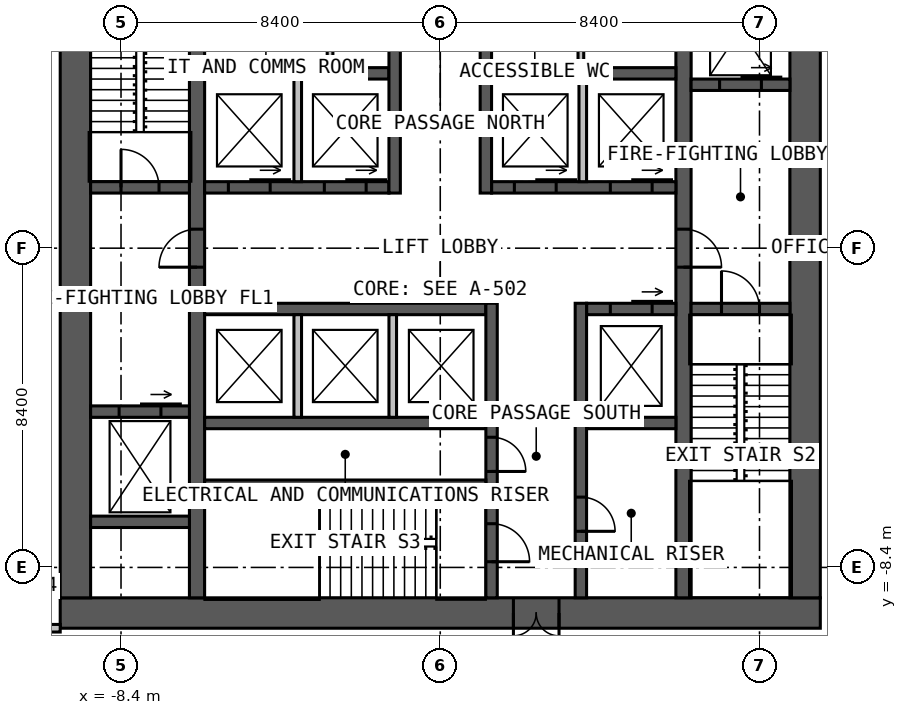
"""IFC4 building model, lengths in metres.
Left out: names, types, materials, properties, quantities, classifications, styles, units other than length and angle.
Written with IfcOpenShell. Run it as: python <this file> out.ifc"""

import sys

from ifc_helpers import new_model, si_unit, direction, frame, frame_2d, origin, place, context, subcontext, project, spatial, rectangle, extrude, element, fill, save


model = new_model("IFC4")
c1 = context("Model", 3, precision=1e-05, world=origin(), true_north=direction((0.0, 1.0)))
c2 = subcontext(c1, "Body", "Model", "MODEL_VIEW")
j1 = project(units=[si_unit("LENGTHUNIT", "METRE"), si_unit("PLANEANGLEUNIT", "RADIAN")], contexts=[c1])
p1 = place(None, origin())
s1 = spatial("IfcSite", under=j1, at=p1, CompositionType="ELEMENT")
p2 = place(p1, origin())
s2 = spatial("IfcBuilding", under=s1, at=p2, CompositionType="ELEMENT")
p3 = place(p2, frame((0.0, 0.0, 65.0)))
s3 = spatial("IfcBuildingStorey", under=s2, at=p3, CompositionType="ELEMENT", Elevation=65.0)
p4 = place(p3, frame((10.0, -9.6, 0.0), z_axis=(0.0, 0.0, 1.0), x_axis=(-1.0, 0.0, 0.0)))
e1 = element("IfcWall", 1, at=p4, inside=s3, PredefinedType="SOLIDWALL", context=c2, shape_type="SweptSolid", body=[
    extrude(rectangle(XDim=20.0, YDim=0.8, at=frame_2d((10.0, 0.0))), origin(), (0.0, 0.0, 1.0), 4.0),
])
p5 = place(p4, frame((6.875, 0.0, 0.0)))
e2 = element("IfcOpeningElement", 2, at=p5, cuts=e1, PredefinedType="OPENING", context=c2, shape_type="SweptSolid", body=[
    extrude(rectangle(XDim=1.2, YDim=2.2, at=frame_2d((0.6, 1.1))), frame((0.0, 0.41, 0.0), z_axis=(0.0, -1.0, 0.0), x_axis=(1.0, 0.0, 0.0)), (0.0, 0.0, 1.0), 0.82),
])
for number, where, z_axis, x_axis in (
    (3, (9.6, -9.2, 0.0), (0.0, 0.0, 1.0), (0.0, 1.0, 0.0)),
    (4, (-9.6, 9.2, 0.0), (0.0, 0.0, 1.0), (0.0, -1.0, 0.0)),
):
    element("IfcWall", number, at=place(p3, frame(where, z_axis=z_axis, x_axis=x_axis)), inside=s3, PredefinedType="SOLIDWALL", context=c2, shape_type="SweptSolid", body=[
        extrude(rectangle(XDim=18.4, YDim=0.8, at=frame_2d((9.2, 0.0))), origin(), (0.0, 0.0, 1.0), 4.0),
    ])
p6 = place(p3, frame((-6.4, -9.2, 0.0), z_axis=(0.0, 0.0, 1.0), x_axis=(0.0, 1.0, 0.0)))
e5 = element("IfcWall", 5, at=p6, inside=s3, PredefinedType="SOLIDWALL", context=c2, shape_type="SweptSolid", body=[
    extrude(rectangle(XDim=18.4, YDim=0.4, at=frame_2d((9.2, 0.0))), origin(), (0.0, 0.0, 1.0), 4.0),
])
p7 = place(p6, frame((8.7, 0.0, 0.0)))
e6 = element("IfcOpeningElement", 6, at=p7, cuts=e5, PredefinedType="OPENING", context=c2, shape_type="SweptSolid", body=[
    extrude(rectangle(XDim=1.0, YDim=2.2, at=frame_2d((0.5, 1.1))), frame((0.0, 0.21, 0.0), z_axis=(0.0, -1.0, 0.0), x_axis=(1.0, 0.0, 0.0)), (0.0, 0.0, 1.0), 0.42),
])
p8 = place(p3, frame((6.4, 9.2, 0.0), z_axis=(0.0, 0.0, 1.0), x_axis=(0.0, -1.0, 0.0)))
e7 = element("IfcWall", 7, at=p8, inside=s3, PredefinedType="SOLIDWALL", context=c2, shape_type="SweptSolid", body=[
    extrude(rectangle(XDim=18.4, YDim=0.4, at=frame_2d((9.2, 0.0))), origin(), (0.0, 0.0, 1.0), 4.0),
])
p9 = place(p8, frame((8.7, 0.0, 0.0)))
e8 = element("IfcOpeningElement", 8, at=p9, cuts=e7, PredefinedType="OPENING", context=c2, shape_type="SweptSolid", body=[
    extrude(rectangle(XDim=1.0, YDim=2.2, at=frame_2d((0.5, 1.1))), frame((0.0, 0.21, 0.0), z_axis=(0.0, -1.0, 0.0), x_axis=(1.0, 0.0, 0.0)), (0.0, 0.0, 1.0), 0.42),
])
p10 = place(p3, frame((-6.2, 1.6, 0.0), z_axis=(0.0, 0.0, 1.0), x_axis=(1.0, 0.0, 0.0)))
e9 = element("IfcWall", 9, at=p10, inside=s3, PredefinedType="SOLIDWALL", context=c2, shape_type="SweptSolid", body=[
    extrude(rectangle(XDim=4.85, YDim=0.3, at=frame_2d((2.425, 0.0))), origin(), (0.0, 0.0, 1.0), 4.0),
])
p11 = place(p10, frame((0.625, 0.0, 0.0)))
e10 = element("IfcOpeningElement", 10, at=p11, cuts=e9, PredefinedType="OPENING", context=c2, shape_type="SweptSolid", body=[
    extrude(rectangle(XDim=1.1, YDim=2.2, at=frame_2d((0.55, 1.1))), frame((0.0, 0.16, 0.0), z_axis=(0.0, -1.0, 0.0), x_axis=(1.0, 0.0, 0.0)), (0.0, 0.0, 1.0), 0.32),
])
p12 = place(p10, frame((3.15, 0.0, 0.0)))
e11 = element("IfcOpeningElement", 11, at=p12, cuts=e9, PredefinedType="OPENING", context=c2, shape_type="SweptSolid", body=[
    extrude(rectangle(XDim=1.1, YDim=2.2, at=frame_2d((0.55, 1.1))), frame((0.0, 0.16, 0.0), z_axis=(0.0, -1.0, 0.0), x_axis=(1.0, 0.0, 0.0)), (0.0, 0.0, 1.0), 0.32),
])
p13 = place(p3, frame((1.35, 1.6, 0.0), z_axis=(0.0, 0.0, 1.0), x_axis=(1.0, 0.0, 0.0)))
e12 = element("IfcWall", 12, at=p13, inside=s3, PredefinedType="SOLIDWALL", context=c2, shape_type="SweptSolid", body=[
    extrude(rectangle(XDim=4.85, YDim=0.3, at=frame_2d((2.425, 0.0))), origin(), (0.0, 0.0, 1.0), 4.0),
])
p14 = place(p13, frame((0.6, 0.0, 0.0)))
e13 = element("IfcOpeningElement", 13, at=p14, cuts=e12, PredefinedType="OPENING", context=c2, shape_type="SweptSolid", body=[
    extrude(rectangle(XDim=1.1, YDim=2.2, at=frame_2d((0.55, 1.1))), frame((0.0, 0.16, 0.0), z_axis=(0.0, -1.0, 0.0), x_axis=(1.0, 0.0, 0.0)), (0.0, 0.0, 1.0), 0.32),
])
p15 = place(p13, frame((3.125, 0.0, 0.0)))
e14 = element("IfcOpeningElement", 14, at=p15, cuts=e12, PredefinedType="OPENING", context=c2, shape_type="SweptSolid", body=[
    extrude(rectangle(XDim=1.1, YDim=2.2, at=frame_2d((0.55, 1.1))), frame((0.0, 0.16, 0.0), z_axis=(0.0, -1.0, 0.0), x_axis=(1.0, 0.0, 0.0)), (0.0, 0.0, 1.0), 0.32),
])
for number, where, z_axis, x_axis in (
    (15, (-6.2, 4.6, 0.0), (0.0, 0.0, 1.0), (1.0, 0.0, 0.0)),
    (16, (1.35, 4.6, 0.0), (0.0, 0.0, 1.0), (1.0, 0.0, 0.0)),
):
    element("IfcWall", number, at=place(p3, frame(where, z_axis=z_axis, x_axis=x_axis)), inside=s3, PredefinedType="SOLIDWALL", context=c2, shape_type="SweptSolid", body=[
        extrude(rectangle(XDim=4.85, YDim=0.3, at=frame_2d((2.425, 0.0))), origin(), (0.0, 0.0, 1.0), 4.0),
    ])
p16 = place(p3, frame((-1.2, 1.45, 0.0), z_axis=(0.0, 0.0, 1.0), x_axis=(0.0, 1.0, 0.0)))
e17 = element("IfcWall", 17, at=p16, inside=s3, PredefinedType="SOLIDWALL", context=c2, shape_type="SweptSolid", body=[
    extrude(rectangle(XDim=7.75, YDim=0.3, at=frame_2d((3.875, 0.0))), origin(), (0.0, 0.0, 1.0), 4.0),
])
p17 = place(p16, frame((5.05, 0.0, 0.0)))
e18 = element("IfcOpeningElement", 18, at=p17, cuts=e17, PredefinedType="OPENING", context=c2, shape_type="SweptSolid", body=[
    extrude(rectangle(XDim=1.0, YDim=2.2, at=frame_2d((0.5, 1.1))), frame((0.0, 0.16, 0.0), z_axis=(0.0, -1.0, 0.0), x_axis=(1.0, 0.0, 0.0)), (0.0, 0.0, 1.0), 0.32),
])
p18 = place(p3, frame((1.2, 1.45, 0.0), z_axis=(0.0, 0.0, 1.0), x_axis=(0.0, 1.0, 0.0)))
e19 = element("IfcWall", 19, at=p18, inside=s3, PredefinedType="SOLIDWALL", context=c2, shape_type="SweptSolid", body=[
    extrude(rectangle(XDim=7.75, YDim=0.3, at=frame_2d((3.875, 0.0))), origin(), (0.0, 0.0, 1.0), 4.0),
])
p19 = place(p18, frame((3.8, 0.0, 0.0)))
e20 = element("IfcOpeningElement", 20, at=p19, cuts=e19, PredefinedType="OPENING", context=c2, shape_type="SweptSolid", body=[
    extrude(rectangle(XDim=1.0, YDim=2.2, at=frame_2d((0.5, 1.1))), frame((0.0, 0.16, 0.0), z_axis=(0.0, -1.0, 0.0), x_axis=(1.0, 0.0, 0.0)), (0.0, 0.0, 1.0), 0.32),
])
p20 = place(p18, frame((6.15, 0.0, 0.0)))
e21 = element("IfcOpeningElement", 21, at=p20, cuts=e19, PredefinedType="OPENING", context=c2, shape_type="SweptSolid", body=[
    extrude(rectangle(XDim=1.0, YDim=2.2, at=frame_2d((0.5, 1.1))), frame((0.0, 0.16, 0.0), z_axis=(0.0, -1.0, 0.0), x_axis=(1.0, 0.0, 0.0)), (0.0, 0.0, 1.0), 0.32),
])
p21 = place(p3, frame((-6.2, -1.6, 0.0), z_axis=(0.0, 0.0, 1.0), x_axis=(1.0, 0.0, 0.0)))
e22 = element("IfcWall", 22, at=p21, inside=s3, PredefinedType="SOLIDWALL", context=c2, shape_type="SweptSolid", body=[
    extrude(rectangle(XDim=7.4, YDim=0.3, at=frame_2d((3.7, 0.0))), origin(), (0.0, 0.0, 1.0), 4.0),
])
p22 = place(p3, frame((3.85, -1.6, 0.0), z_axis=(0.0, 0.0, 1.0), x_axis=(1.0, 0.0, 0.0)))
e23 = element("IfcWall", 23, at=p22, inside=s3, PredefinedType="SOLIDWALL", context=c2, shape_type="SweptSolid", body=[
    extrude(rectangle(XDim=2.35, YDim=0.3, at=frame_2d((1.175, 0.0))), origin(), (0.0, 0.0, 1.0), 4.0),
])
p23 = place(p22, frame((0.625, 0.0, 0.0)))
e24 = element("IfcOpeningElement", 24, at=p23, cuts=e23, PredefinedType="OPENING", context=c2, shape_type="SweptSolid", body=[
    extrude(rectangle(XDim=1.1, YDim=2.2, at=frame_2d((0.55, 1.1))), frame((0.0, 0.16, 0.0), z_axis=(0.0, -1.0, 0.0), x_axis=(1.0, 0.0, 0.0)), (0.0, 0.0, 1.0), 0.32),
])
p24 = place(p3, frame((-6.2, -4.6, 0.0), z_axis=(0.0, 0.0, 1.0), x_axis=(1.0, 0.0, 0.0)))
e25 = element("IfcWall", 25, at=p24, inside=s3, PredefinedType="SOLIDWALL", context=c2, shape_type="SweptSolid", body=[
    extrude(rectangle(XDim=7.4, YDim=0.3, at=frame_2d((3.7, 0.0))), origin(), (0.0, 0.0, 1.0), 4.0),
])
p25 = place(p3, frame((3.85, -4.6, 0.0), z_axis=(0.0, 0.0, 1.0), x_axis=(1.0, 0.0, 0.0)))
e26 = element("IfcWall", 26, at=p25, inside=s3, PredefinedType="SOLIDWALL", context=c2, shape_type="SweptSolid", body=[
    extrude(rectangle(XDim=2.35, YDim=0.3, at=frame_2d((1.175, 0.0))), origin(), (0.0, 0.0, 1.0), 4.0),
])
p26 = place(p3, frame((1.35, -1.45, 0.0), z_axis=(0.0, 0.0, 1.0), x_axis=(0.0, -1.0, 0.0)))
e27 = element("IfcWall", 27, at=p26, inside=s3, PredefinedType="SOLIDWALL", context=c2, shape_type="SweptSolid", body=[
    extrude(rectangle(XDim=7.75, YDim=0.3, at=frame_2d((3.875, 0.0))), origin(), (0.0, 0.0, 1.0), 4.0),
])
p27 = place(p26, frame((5.8, 0.0, 0.0)))
e28 = element("IfcOpeningElement", 28, at=p27, cuts=e27, PredefinedType="OPENING", context=c2, shape_type="SweptSolid", body=[
    extrude(rectangle(XDim=1.0, YDim=2.2, at=frame_2d((0.5, 1.1))), frame((0.0, 0.16, 0.0), z_axis=(0.0, -1.0, 0.0), x_axis=(1.0, 0.0, 0.0)), (0.0, 0.0, 1.0), 0.32),
])
p28 = place(p26, frame((3.525, 0.0, 0.0)))
e29 = element("IfcOpeningElement", 29, at=p28, cuts=e27, PredefinedType="OPENING", context=c2, shape_type="SweptSolid", body=[
    extrude(rectangle(XDim=0.9, YDim=2.2, at=frame_2d((0.45, 1.1))), frame((0.0, 0.16, 0.0), z_axis=(0.0, -1.0, 0.0), x_axis=(1.0, 0.0, 0.0)), (0.0, 0.0, 1.0), 0.32),
])
p29 = place(p3, frame((3.7, -1.45, 0.0), z_axis=(0.0, 0.0, 1.0), x_axis=(0.0, -1.0, 0.0)))
e30 = element("IfcWall", 30, at=p29, inside=s3, PredefinedType="SOLIDWALL", context=c2, shape_type="SweptSolid", body=[
    extrude(rectangle(XDim=7.75, YDim=0.3, at=frame_2d((3.875, 0.0))), origin(), (0.0, 0.0, 1.0), 4.0),
])
p30 = place(p29, frame((5.1, 0.0, 0.0)))
e31 = element("IfcOpeningElement", 31, at=p30, cuts=e30, PredefinedType="OPENING", context=c2, shape_type="SweptSolid", body=[
    extrude(rectangle(XDim=0.9, YDim=2.2, at=frame_2d((0.45, 1.1))), frame((0.0, 0.16, 0.0), z_axis=(0.0, -1.0, 0.0), x_axis=(1.0, 0.0, 0.0)), (0.0, 0.0, 1.0), 0.32),
])
p31 = place(p3, frame((-6.2, -6.2, 0.0), z_axis=(0.0, 0.0, 1.0), x_axis=(1.0, 0.0, 0.0)))
e32 = element("IfcWall", 32, at=p31, inside=s3, PredefinedType="SOLIDWALL", context=c2, shape_type="SweptSolid", body=[
    extrude(rectangle(XDim=7.4, YDim=0.2, at=frame_2d((3.7, 0.0))), origin(), (0.0, 0.0, 1.0), 4.0),
])
p32 = place(p3, frame((-9.2, 1.6, 0.0), z_axis=(0.0, 0.0, 1.0), x_axis=(1.0, 0.0, 0.0)))
e33 = element("IfcWall", 33, at=p32, inside=s3, PredefinedType="SOLIDWALL", context=c2, shape_type="SweptSolid", body=[
    extrude(rectangle(XDim=2.6, YDim=0.3, at=frame_2d((1.3, 0.0))), origin(), (0.0, 0.0, 1.0), 4.0),
])
p33 = place(p32, frame((0.8, 0.0, 0.0)))
e34 = element("IfcOpeningElement", 34, at=p33, cuts=e33, PredefinedType="OPENING", context=c2, shape_type="SweptSolid", body=[
    extrude(rectangle(XDim=1.0, YDim=2.2, at=frame_2d((0.5, 1.1))), frame((0.0, 0.16, 0.0), z_axis=(0.0, -1.0, 0.0), x_axis=(1.0, 0.0, 0.0)), (0.0, 0.0, 1.0), 0.32),
])
p34 = place(p3, frame((6.6, -1.6, 0.0), z_axis=(0.0, 0.0, 1.0), x_axis=(1.0, 0.0, 0.0)))
e35 = element("IfcWall", 35, at=p34, inside=s3, PredefinedType="SOLIDWALL", context=c2, shape_type="SweptSolid", body=[
    extrude(rectangle(XDim=2.6, YDim=0.3, at=frame_2d((1.3, 0.0))), origin(), (0.0, 0.0, 1.0), 4.0),
])
p35 = place(p34, frame((0.8, 0.0, 0.0)))
e36 = element("IfcOpeningElement", 36, at=p35, cuts=e35, PredefinedType="OPENING", context=c2, shape_type="SweptSolid", body=[
    extrude(rectangle(XDim=1.0, YDim=2.2, at=frame_2d((0.5, 1.1))), frame((0.0, 0.16, 0.0), z_axis=(0.0, -1.0, 0.0), x_axis=(1.0, 0.0, 0.0)), (0.0, 0.0, 1.0), 0.32),
])
p36 = place(p3, frame((-9.2, -4.3, 0.0), z_axis=(0.0, 0.0, 1.0), x_axis=(1.0, 0.0, 0.0)))
e37 = element("IfcWall", 37, at=p36, inside=s3, PredefinedType="SOLIDWALL", context=c2, shape_type="SweptSolid", body=[
    extrude(rectangle(XDim=2.6, YDim=0.3, at=frame_2d((1.3, 0.0))), origin(), (0.0, 0.0, 1.0), 4.0),
])
p37 = place(p36, frame((0.75, 0.0, 0.0)))
e38 = element("IfcOpeningElement", 38, at=p37, cuts=e37, PredefinedType="OPENING", context=c2, shape_type="SweptSolid", body=[
    extrude(rectangle(XDim=1.1, YDim=2.2, at=frame_2d((0.55, 1.1))), frame((0.0, 0.16, 0.0), z_axis=(0.0, -1.0, 0.0), x_axis=(1.0, 0.0, 0.0)), (0.0, 0.0, 1.0), 0.32),
])
p38 = place(p3, frame((6.6, 4.3, 0.0), z_axis=(0.0, 0.0, 1.0), x_axis=(1.0, 0.0, 0.0)))
e39 = element("IfcWall", 39, at=p38, inside=s3, PredefinedType="SOLIDWALL", context=c2, shape_type="SweptSolid", body=[
    extrude(rectangle(XDim=2.6, YDim=0.3, at=frame_2d((1.3, 0.0))), origin(), (0.0, 0.0, 1.0), 4.0),
])
p39 = place(p38, frame((0.75, 0.0, 0.0)))
e40 = element("IfcOpeningElement", 40, at=p39, cuts=e39, PredefinedType="OPENING", context=c2, shape_type="SweptSolid", body=[
    extrude(rectangle(XDim=1.1, YDim=2.2, at=frame_2d((0.55, 1.1))), frame((0.0, 0.16, 0.0), z_axis=(0.0, -1.0, 0.0), x_axis=(1.0, 0.0, 0.0)), (0.0, 0.0, 1.0), 0.32),
])
p40 = place(p3, frame((-9.2, -7.2, 0.0), z_axis=(0.0, 0.0, 1.0), x_axis=(1.0, 0.0, 0.0)))
e41 = element("IfcWall", 41, at=p40, inside=s3, PredefinedType="SOLIDWALL", context=c2, shape_type="SweptSolid", body=[
    extrude(rectangle(XDim=2.6, YDim=0.3, at=frame_2d((1.3, 0.0))), origin(), (0.0, 0.0, 1.0), 4.0),
])
for number, where, z_axis, x_axis in (
    (42, (-3.75, 1.75, 0.0), (0.0, 0.0, 1.0), (0.0, 1.0, 0.0)),
    (43, (3.75, 1.75, 0.0), (0.0, 0.0, 1.0), (0.0, 1.0, 0.0)),
    (44, (-3.75, -1.75, 0.0), (0.0, 0.0, 1.0), (0.0, -1.0, 0.0)),
    (45, (-1.25, -1.75, 0.0), (0.0, 0.0, 1.0), (0.0, -1.0, 0.0)),
):
    element("IfcWall", number, at=place(p3, frame(where, z_axis=z_axis, x_axis=x_axis)), inside=s3, PredefinedType="SOLIDWALL", context=c2, shape_type="SweptSolid", body=[
        extrude(rectangle(XDim=2.7, YDim=0.2, at=frame_2d((1.35, 0.0))), origin(), (0.0, 0.0, 1.0), 3.75),
    ])
p41 = place(p3, frame((3.7, 4.75, 0.0), z_axis=(0.0, 0.0, 1.0), x_axis=(0.0, 1.0, 0.0)))
e46 = element("IfcWall", 46, at=p41, inside=s3, PredefinedType="PARTITIONING", context=c2, shape_type="SweptSolid", body=[
    extrude(rectangle(XDim=1.975, YDim=0.15, at=frame_2d((0.988, 0.0))), origin(), (0.0, 0.0, 1.0), 3.75),
])
p42 = place(p3, frame((-2.9, 4.75, 0.0), z_axis=(0.0, 0.0, 1.0), x_axis=(0.0, 1.0, 0.0)))
e47 = element("IfcWall", 47, at=p42, inside=s3, PredefinedType="PARTITIONING", context=c2, shape_type="SweptSolid", body=[
    extrude(rectangle(XDim=4.45, YDim=0.15, at=frame_2d((2.225, 0.0))), origin(), (0.0, 0.0, 1.0), 3.75),
])
p43 = place(p42, frame((2.95, 0.0, 0.0)))
e48 = element("IfcOpeningElement", 48, at=p43, cuts=e47, PredefinedType="OPENING", context=c2, shape_type="SweptSolid", body=[
    extrude(rectangle(XDim=1.0, YDim=2.2, at=frame_2d((0.5, 1.1))), frame((0.0, 0.085, 0.0), z_axis=(0.0, -1.0, 0.0), x_axis=(1.0, 0.0, 0.0)), (0.0, 0.0, 1.0), 0.17),
])
p44 = place(p42, frame((0.6, 0.0, 0.0)))
e49 = element("IfcOpeningElement", 49, at=p44, cuts=e47, PredefinedType="OPENING", context=c2, shape_type="SweptSolid", body=[
    extrude(rectangle(XDim=0.9, YDim=2.2, at=frame_2d((0.45, 1.1))), frame((0.0, 0.085, 0.0), z_axis=(0.0, -1.0, 0.0), x_axis=(1.0, 0.0, 0.0)), (0.0, 0.0, 1.0), 0.17),
])
p45 = place(p3, frame((-10.0, -10.0, 0.0), z_axis=(0.0, 0.0, 1.0), x_axis=(-1.0, 0.0, 0.0)))
e50 = element("IfcWall", 50, at=p45, inside=s3, PredefinedType="PARTITIONING", context=c2, shape_type="SweptSolid", body=[
    extrude(rectangle(XDim=2.0, YDim=0.2, at=frame_2d((1.0, 0.0))), origin(), (0.0, 0.0, 1.0), 3.8),
])
p46 = place(p45, frame((0.5, 0.0, 0.0)))
e51 = element("IfcOpeningElement", 51, at=p46, cuts=e50, PredefinedType="OPENING", context=c2, shape_type="SweptSolid", body=[
    extrude(rectangle(XDim=1.0, YDim=2.2, at=frame_2d((0.5, 1.1))), frame((0.0, 0.11, 0.0), z_axis=(0.0, -1.0, 0.0), x_axis=(1.0, 0.0, 0.0)), (0.0, 0.0, 1.0), 0.22),
])
p47 = place(p5, origin())
e52 = element("IfcDoor", 52, at=p47, inside=s3, OperationType="DOUBLE_DOOR_SINGLE_SWING", PredefinedType="DOOR", context=c2, shape_type="SweptSolid", body=[
    extrude(rectangle(XDim=1.2, YDim=2.2, at=frame_2d((0.6, 1.1))), frame((0.0, 0.025, 0.0), z_axis=(0.0, -1.0, 0.0), x_axis=(1.0, 0.0, 0.0)), (0.0, 0.0, 1.0), 0.05),
])
fill(e2, e52)
p48 = place(p7, origin())
e53 = element("IfcDoor", 53, at=p48, inside=s3, OperationType="SINGLE_SWING_LEFT", PredefinedType="DOOR", context=c2, shape_type="SweptSolid", body=[
    extrude(rectangle(XDim=1.0, YDim=2.2, at=frame_2d((0.5, 1.1))), frame((0.0, 0.025, 0.0), z_axis=(0.0, -1.0, 0.0), x_axis=(1.0, 0.0, 0.0)), (0.0, 0.0, 1.0), 0.05),
])
fill(e6, e53)
p49 = place(p9, origin())
e54 = element("IfcDoor", 54, at=p49, inside=s3, OperationType="SINGLE_SWING_RIGHT", PredefinedType="DOOR", context=c2, shape_type="SweptSolid", body=[
    extrude(rectangle(XDim=1.0, YDim=2.2, at=frame_2d((0.5, 1.1))), frame((0.0, 0.025, 0.0), z_axis=(0.0, -1.0, 0.0), x_axis=(1.0, 0.0, 0.0)), (0.0, 0.0, 1.0), 0.05),
])
fill(e8, e54)
p50 = place(p33, origin())
e55 = element("IfcDoor", 55, at=p50, inside=s3, OperationType="SINGLE_SWING_LEFT", PredefinedType="DOOR", context=c2, shape_type="SweptSolid", body=[
    extrude(rectangle(XDim=1.0, YDim=2.2, at=frame_2d((0.5, 1.1))), frame((0.0, 0.025, 0.0), z_axis=(0.0, -1.0, 0.0), x_axis=(1.0, 0.0, 0.0)), (0.0, 0.0, 1.0), 0.05),
])
fill(e34, e55)
p51 = place(p35, origin())
e56 = element("IfcDoor", 56, at=p51, inside=s3, OperationType="SINGLE_SWING_LEFT", PredefinedType="DOOR", context=c2, shape_type="SweptSolid", body=[
    extrude(rectangle(XDim=1.0, YDim=2.2, at=frame_2d((0.5, 1.1))), frame((0.0, 0.025, 0.0), z_axis=(0.0, -1.0, 0.0), x_axis=(1.0, 0.0, 0.0)), (0.0, 0.0, 1.0), 0.05),
])
fill(e36, e56)
p52 = place(p27, origin())
e57 = element("IfcDoor", 57, at=p52, inside=s3, OperationType="SINGLE_SWING_RIGHT", PredefinedType="DOOR", context=c2, shape_type="SweptSolid", body=[
    extrude(rectangle(XDim=1.0, YDim=2.2, at=frame_2d((0.5, 1.1))), frame((0.0, 0.025, 0.0), z_axis=(0.0, -1.0, 0.0), x_axis=(1.0, 0.0, 0.0)), (0.0, 0.0, 1.0), 0.05),
])
fill(e28, e57)
p53 = place(p28, origin())
e58 = element("IfcDoor", 58, at=p53, inside=s3, OperationType="SINGLE_SWING_RIGHT", PredefinedType="DOOR", context=c2, shape_type="SweptSolid", body=[
    extrude(rectangle(XDim=0.9, YDim=2.2, at=frame_2d((0.45, 1.1))), frame((0.0, 0.025, 0.0), z_axis=(0.0, -1.0, 0.0), x_axis=(1.0, 0.0, 0.0)), (0.0, 0.0, 1.0), 0.05),
])
fill(e29, e58)
p54 = place(p30, origin())
e59 = element("IfcDoor", 59, at=p54, inside=s3, OperationType="SINGLE_SWING_RIGHT", PredefinedType="DOOR", context=c2, shape_type="SweptSolid", body=[
    extrude(rectangle(XDim=0.9, YDim=2.2, at=frame_2d((0.45, 1.1))), frame((0.0, 0.025, 0.0), z_axis=(0.0, -1.0, 0.0), x_axis=(1.0, 0.0, 0.0)), (0.0, 0.0, 1.0), 0.05),
])
fill(e31, e59)
p55 = place(p11, origin())
e60 = element("IfcDoor", 60, at=p55, inside=s3, OperationType="SLIDING_TO_LEFT", PredefinedType="DOOR", context=c2, shape_type="SweptSolid", body=[
    extrude(rectangle(XDim=1.1, YDim=2.2, at=frame_2d((0.55, 1.1))), frame((0.0, 0.025, 0.0), z_axis=(0.0, -1.0, 0.0), x_axis=(1.0, 0.0, 0.0)), (0.0, 0.0, 1.0), 0.05),
])
fill(e10, e60)
p56 = place(p12, origin())
e61 = element("IfcDoor", 61, at=p56, inside=s3, OperationType="SLIDING_TO_LEFT", PredefinedType="DOOR", context=c2, shape_type="SweptSolid", body=[
    extrude(rectangle(XDim=1.1, YDim=2.2, at=frame_2d((0.55, 1.1))), frame((0.0, 0.025, 0.0), z_axis=(0.0, -1.0, 0.0), x_axis=(1.0, 0.0, 0.0)), (0.0, 0.0, 1.0), 0.05),
])
fill(e11, e61)
p57 = place(p14, origin())
e62 = element("IfcDoor", 62, at=p57, inside=s3, OperationType="SLIDING_TO_LEFT", PredefinedType="DOOR", context=c2, shape_type="SweptSolid", body=[
    extrude(rectangle(XDim=1.1, YDim=2.2, at=frame_2d((0.55, 1.1))), frame((0.0, 0.025, 0.0), z_axis=(0.0, -1.0, 0.0), x_axis=(1.0, 0.0, 0.0)), (0.0, 0.0, 1.0), 0.05),
])
fill(e13, e62)
p58 = place(p15, origin())
e63 = element("IfcDoor", 63, at=p58, inside=s3, OperationType="SLIDING_TO_LEFT", PredefinedType="DOOR", context=c2, shape_type="SweptSolid", body=[
    extrude(rectangle(XDim=1.1, YDim=2.2, at=frame_2d((0.55, 1.1))), frame((0.0, 0.025, 0.0), z_axis=(0.0, -1.0, 0.0), x_axis=(1.0, 0.0, 0.0)), (0.0, 0.0, 1.0), 0.05),
])
fill(e14, e63)
p59 = place(p23, origin())
e64 = element("IfcDoor", 64, at=p59, inside=s3, OperationType="SLIDING_TO_LEFT", PredefinedType="DOOR", context=c2, shape_type="SweptSolid", body=[
    extrude(rectangle(XDim=1.1, YDim=2.2, at=frame_2d((0.55, 1.1))), frame((0.0, 0.025, 0.0), z_axis=(0.0, -1.0, 0.0), x_axis=(1.0, 0.0, 0.0)), (0.0, 0.0, 1.0), 0.05),
])
fill(e24, e64)
p60 = place(p37, origin())
e65 = element("IfcDoor", 65, at=p60, inside=s3, OperationType="SLIDING_TO_LEFT", PredefinedType="DOOR", context=c2, shape_type="SweptSolid", body=[
    extrude(rectangle(XDim=1.1, YDim=2.2, at=frame_2d((0.55, 1.1))), frame((0.0, 0.025, 0.0), z_axis=(0.0, -1.0, 0.0), x_axis=(1.0, 0.0, 0.0)), (0.0, 0.0, 1.0), 0.05),
])
fill(e38, e65)
p61 = place(p39, origin())
e66 = element("IfcDoor", 66, at=p61, inside=s3, OperationType="SLIDING_TO_LEFT", PredefinedType="DOOR", context=c2, shape_type="SweptSolid", body=[
    extrude(rectangle(XDim=1.1, YDim=2.2, at=frame_2d((0.55, 1.1))), frame((0.0, 0.025, 0.0), z_axis=(0.0, -1.0, 0.0), x_axis=(1.0, 0.0, 0.0)), (0.0, 0.0, 1.0), 0.05),
])
fill(e40, e66)
save(model, sys.argv[1])
